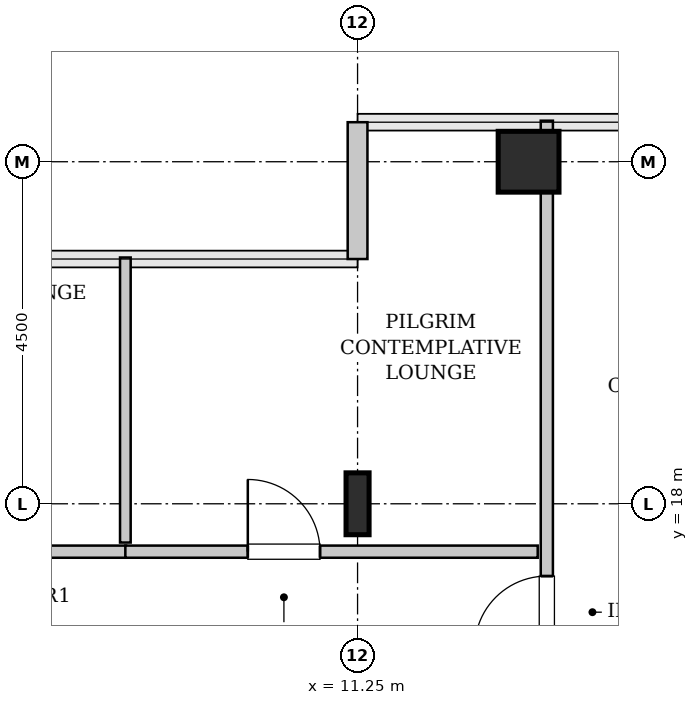
"""IFC4 building model, lengths in metres.
Left out: names, types, materials, properties, quantities, classifications, styles, units other than length and angle.
Written with IfcOpenShell. Run it as: python <this file> out.ifc"""

import sys

from ifc_helpers import new_model, si_unit, direction, frame, frame_2d, origin, origin_2d, place, context, subcontext, project, spatial, rectangle, hollow_rectangle, i_section, extrude, source, transform, mapped, element, fill, save


model = new_model("IFC4")
c1 = context("Model", 3, precision=1e-05, world=origin(), true_north=direction((0.0, 1.0)))
c2 = subcontext(c1, "Body", "Model", "MODEL_VIEW")
j1 = project(units=[si_unit("LENGTHUNIT", "METRE"), si_unit("PLANEANGLEUNIT", "RADIAN")], contexts=[c1])
p1 = place(None, origin())
s1 = spatial("IfcSite", under=j1, at=p1, CompositionType="ELEMENT")
p2 = place(p1, origin())
s2 = spatial("IfcBuilding", under=s1, at=p2, CompositionType="ELEMENT")
p3 = place(p2, frame((0.0, 0.0, 156.4)))
s3 = spatial("IfcBuildingStorey", under=s2, at=p3, CompositionType="ELEMENT", Elevation=156.4)
m1 = source(origin(), c2, "Body", "SweptSolid", [
    extrude(i_section(OverallWidth=0.303, OverallDepth=0.814, WebThickness=0.021, FlangeThickness=0.04, FilletRadius=0.03, at=origin_2d()), origin(), (0.0, 0.0, 1.0), 3.8),
])
p4 = place(p3, frame((11.25, 18.0, 0.0), z_axis=(0.0, 0.0, 1.0), x_axis=(1.0, 0.0, 0.0)))
e1 = element("IfcColumn", 1, at=p4, inside=s3, PredefinedType="COLUMN", context=c2, shape_type="MappedRepresentation", body=[
    mapped(m1, transform((0.0, 0.0, 0.0), x_axis=(1.0, 0.0, 0.0), y_axis=(0.0, 1.0, 0.0), z_axis=(0.0, 0.0, 1.0), scale=1.0)),
])
m2 = source(origin(), c2, "Body", "SweptSolid", [
    extrude(hollow_rectangle(XDim=0.8, YDim=0.8, WallThickness=0.04, InnerFilletRadius=0.04, OuterFilletRadius=0.08, at=origin_2d()), origin(), (0.0, 0.0, 1.0), 3.8),
])
p5 = place(p3, frame((13.5, 22.5, 0.0), z_axis=(0.0, 0.0, 1.0), x_axis=(1.0, 0.0, 0.0)))
e2 = element("IfcColumn", 2, at=p5, inside=s3, PredefinedType="COLUMN", context=c2, shape_type="MappedRepresentation", body=[
    mapped(m2, transform((0.0, 0.0, 0.0), x_axis=(1.0, 0.0, 0.0), y_axis=(0.0, 1.0, 0.0), z_axis=(0.0, 0.0, 1.0), scale=1.0)),
])
m3 = source(origin(), c2, "Body", "SweptSolid", [
    extrude(rectangle(XDim=1.8, YDim=0.26, at=frame_2d((0.9, 0.0))), origin(), (0.0, 0.0, 1.0), 3.55),
])
p6 = place(p3, frame((11.25, 23.02, 0.0), z_axis=(0.0, 0.0, 1.0), x_axis=(0.0, -1.0, 0.0)))
e3 = element("IfcWall", 3, at=p6, inside=s3, PredefinedType="SOLIDWALL", context=c2, shape_type="MappedRepresentation", body=[
    mapped(m3, transform((0.0, 0.0, 0.0), x_axis=(1.0, 0.0, 0.0), y_axis=(0.0, 1.0, 0.0), z_axis=(0.0, 0.0, 1.0), scale=1.0)),
])
m4 = source(origin(), c2, "Body", "SweptSolid", [
    extrude(rectangle(XDim=7.302, YDim=0.16, at=frame_2d((3.651, 0.0))), origin(), (0.0, 0.0, 1.0), 3.535),
])
p7 = place(p3, frame((13.74, 15.738, 0.0), z_axis=(0.0, 0.0, 1.0), x_axis=(0.0, 1.0, 0.0)))
e4 = element("IfcWall", 4, at=p7, inside=s3, PredefinedType="PARTITIONING", context=c2, shape_type="MappedRepresentation", body=[
    mapped(m4, transform((0.0, 0.0, 0.0), x_axis=(1.0, 0.0, 0.0), y_axis=(0.0, 1.0, 0.0), z_axis=(0.0, 0.0, 1.0), scale=1.0)),
])
p8 = place(p7, frame((0.361, 0.0, 0.0)))
e5 = element("IfcOpeningElement", 5, at=p8, cuts=e4, PredefinedType="OPENING", context=c2, shape_type="SweptSolid", body=[
    extrude(rectangle(XDim=0.95, YDim=2.1, at=frame_2d((0.475, 1.05))), frame((0.0, 0.09, 0.0), z_axis=(0.0, -1.0, 0.0), x_axis=(1.0, 0.0, 0.0)), (0.0, 0.0, 1.0), 0.18),
])
m5 = source(origin(), c2, "Body", "SweptSolid", [
    extrude(rectangle(XDim=5.81, YDim=0.16, at=frame_2d((2.905, 0.0))), origin(), (0.0, 0.0, 1.0), 3.535),
])
p9 = place(p3, frame((2.395, 17.37, 0.0), z_axis=(0.0, 0.0, 1.0), x_axis=(1.0, 0.0, 0.0)))
e6 = element("IfcWall", 6, at=p9, inside=s3, PredefinedType="PARTITIONING", context=c2, shape_type="MappedRepresentation", body=[
    mapped(m5, transform((0.0, 0.0, 0.0), x_axis=(1.0, 0.0, 0.0), y_axis=(0.0, 1.0, 0.0), z_axis=(0.0, 0.0, 1.0), scale=1.0)),
])
p10 = place(p9, frame((2.43, 0.0, 0.0)))
e7 = element("IfcOpeningElement", 7, at=p10, cuts=e6, PredefinedType="OPENING", context=c2, shape_type="SweptSolid", body=[
    extrude(rectangle(XDim=0.95, YDim=2.1, at=frame_2d((0.475, 1.05))), frame((0.0, 0.09, 0.0), z_axis=(0.0, -1.0, 0.0), x_axis=(1.0, 0.0, 0.0)), (0.0, 0.0, 1.0), 0.18),
])
m6 = source(origin(), c2, "Body", "SweptSolid", [
    extrude(rectangle(XDim=3.75, YDim=0.14, at=frame_2d((1.875, 0.0))), origin(), (0.0, 0.0, 1.0), 3.535),
])
p11 = place(p3, frame((8.195, 17.49, 0.0), z_axis=(0.0, 0.0, 1.0), x_axis=(0.0, 1.0, 0.0)))
e8 = element("IfcWall", 8, at=p11, inside=s3, PredefinedType="PARTITIONING", context=c2, shape_type="MappedRepresentation", body=[
    mapped(m6, transform((0.0, 0.0, 0.0), x_axis=(1.0, 0.0, 0.0), y_axis=(0.0, 1.0, 0.0), z_axis=(0.0, 0.0, 1.0), scale=1.0)),
])
m7 = source(origin(), c2, "Body", "SweptSolid", [
    extrude(rectangle(XDim=5.425, YDim=0.16, at=frame_2d((2.712, 0.0))), origin(), (0.0, 0.0, 1.0), 3.535),
])
p12 = place(p3, frame((8.195, 17.37, 0.0), z_axis=(0.0, 0.0, 1.0), x_axis=(1.0, 0.0, 0.0)))
e9 = element("IfcWall", 9, at=p12, inside=s3, PredefinedType="PARTITIONING", context=c2, shape_type="MappedRepresentation", body=[
    mapped(m7, transform((0.0, 0.0, 0.0), x_axis=(1.0, 0.0, 0.0), y_axis=(0.0, 1.0, 0.0), z_axis=(0.0, 0.0, 1.0), scale=1.0)),
])
p13 = place(p12, frame((1.611, 0.0, 0.0)))
e10 = element("IfcOpeningElement", 10, at=p13, cuts=e9, PredefinedType="OPENING", context=c2, shape_type="SweptSolid", body=[
    extrude(rectangle(XDim=0.95, YDim=2.1, at=frame_2d((0.475, 1.05))), frame((0.0, 0.09, 0.0), z_axis=(0.0, -1.0, 0.0), x_axis=(1.0, 0.0, 0.0)), (0.0, 0.0, 1.0), 0.18),
])
m8 = source(origin(), c2, "Body", "SweptSolid", [
    extrude(rectangle(XDim=0.95, YDim=2.1, at=frame_2d((0.475, 1.05))), frame((0.0, 0.025, 0.0), z_axis=(0.0, -1.0, 0.0), x_axis=(1.0, 0.0, 0.0)), (0.0, 0.0, 1.0), 0.05),
])
p14 = place(p8, origin())
e11 = element("IfcDoor", 11, at=p14, inside=s3, OperationType="SINGLE_SWING_LEFT", PredefinedType="DOOR", context=c2, shape_type="MappedRepresentation", body=[
    mapped(m8, transform((0.0, 0.0, 0.0), x_axis=(1.0, 0.0, 0.0), y_axis=(0.0, 1.0, 0.0), z_axis=(0.0, 0.0, 1.0), scale=1.0)),
])
fill(e5, e11)
p15 = place(p13, origin())
e12 = element("IfcDoor", 12, at=p15, inside=s3, OperationType="SINGLE_SWING_LEFT", PredefinedType="DOOR", context=c2, shape_type="MappedRepresentation", body=[
    mapped(m8, transform((0.0, 0.0, 0.0), x_axis=(1.0, 0.0, 0.0), y_axis=(0.0, 1.0, 0.0), z_axis=(0.0, 0.0, 1.0), scale=1.0)),
])
fill(e10, e12)
save(model, sys.argv[1])
